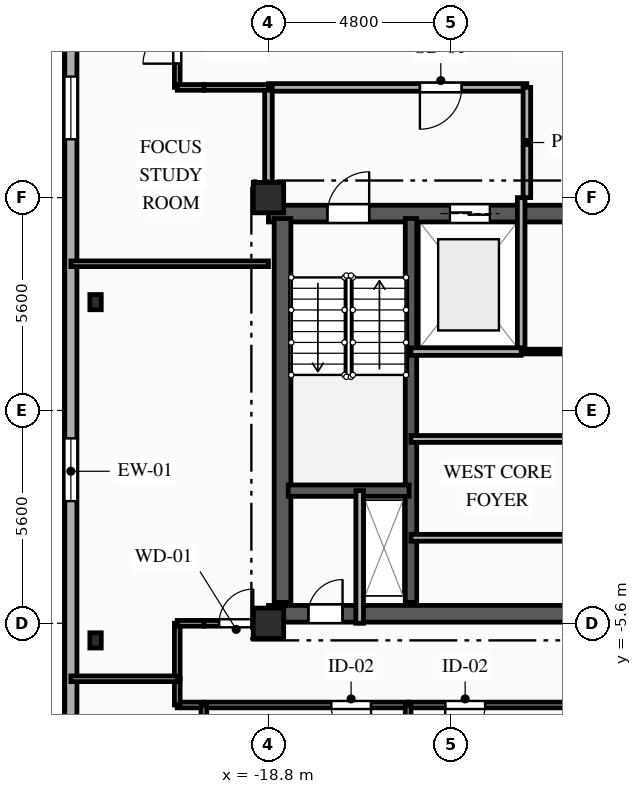
"""IFC4 building model, lengths in metres.
Left out: names, types, materials, properties, quantities, classifications, styles, units other than length and angle.
Written with IfcOpenShell. Run it as: python <this file> out.ifc"""

import sys

from ifc_helpers import new_model, si_unit, direction, frame, frame_2d, origin, origin_2d, place, context, subcontext, project, spatial, rectangle, i_section, extrude, element, fill, save


model = new_model("IFC4")
c1 = context("Model", 3, precision=1e-05, world=origin(), true_north=direction((0.0, 1.0)))
c2 = subcontext(c1, "Body", "Model", "MODEL_VIEW")
j1 = project(units=[si_unit("LENGTHUNIT", "METRE"), si_unit("PLANEANGLEUNIT", "RADIAN")], contexts=[c1])
p1 = place(None, origin())
s1 = spatial("IfcSite", under=j1, at=p1, CompositionType="ELEMENT")
p2 = place(p1, origin())
s2 = spatial("IfcBuilding", under=s1, at=p2, CompositionType="ELEMENT")
p3 = place(p2, frame((0.0, 0.0, 255.1)))
s3 = spatial("IfcBuildingStorey", under=s2, at=p3, CompositionType="ELEMENT", Elevation=255.1)
for number, where, z_axis, x_axis in (
    (1, (-18.8, -5.6, 0.0), (0.0, 0.0, 1.0), (1.0, 0.0, 0.0)),
    (2, (-18.8, 5.6, 0.0), (0.0, 0.0, 1.0), (1.0, 0.0, 0.0)),
):
    element("IfcColumn", number, at=place(p3, frame(where, z_axis=z_axis, x_axis=x_axis)), inside=s3, PredefinedType="COLUMN", context=c2, shape_type="SweptSolid", body=[
        extrude(rectangle(XDim=0.8, YDim=0.8, at=origin_2d()), origin(), (0.0, 0.0, 1.0), 3.35),
    ])
for number, where, z_axis, x_axis in (
    (3, (-23.35, 2.85, 0.0), (0.0, 0.0, 1.0), (1.0, 0.0, 0.0)),
    (4, (-23.35, -6.05, 0.0), (0.0, 0.0, 1.0), (1.0, 0.0, 0.0)),
):
    element("IfcColumn", number, at=place(p3, frame(where, z_axis=z_axis, x_axis=x_axis)), inside=s3, PredefinedType="COLUMN", context=c2, shape_type="SweptSolid", body=[
        extrude(i_section(OverallWidth=0.3, OverallDepth=0.4, WebThickness=0.013, FlangeThickness=0.024, FilletRadius=0.027, at=origin_2d()), origin(), (0.0, 0.0, 1.0), 3.35),
    ])
p4 = place(p3, frame((-24.0, -15.6, 0.0), z_axis=(0.0, 0.0, 1.0), x_axis=(0.0, 1.0, 0.0)))
e5 = element("IfcWall", 5, at=p4, inside=s3, PredefinedType="SOLIDWALL", context=c2, shape_type="SweptSolid", body=[
    extrude(rectangle(XDim=28.0, YDim=0.32, at=frame_2d((14.0, 0.0))), origin(), (0.0, 0.0, 1.0), 3.04),
])
p5 = place(p4, frame((3.695, 0.0, 0.85)))
e6 = element("IfcOpeningElement", 6, at=p5, cuts=e5, PredefinedType="OPENING", context=c2, shape_type="SweptSolid", body=[
    extrude(rectangle(XDim=1.65, YDim=1.85, at=frame_2d((0.825, 0.925))), frame((0.0, 0.17, 0.0), z_axis=(0.0, -1.0, 0.0), x_axis=(1.0, 0.0, 0.0)), (0.0, 0.0, 1.0), 0.34),
])
p6 = place(p4, frame((13.215, 0.0, 0.85)))
e7 = element("IfcOpeningElement", 7, at=p6, cuts=e5, PredefinedType="OPENING", context=c2, shape_type="SweptSolid", body=[
    extrude(rectangle(XDim=1.65, YDim=1.85, at=frame_2d((0.825, 0.925))), frame((0.0, 0.17, 0.0), z_axis=(0.0, -1.0, 0.0), x_axis=(1.0, 0.0, 0.0)), (0.0, 0.0, 1.0), 0.34),
])
p7 = place(p4, frame((22.735, 0.0, 0.85)))
e8 = element("IfcOpeningElement", 8, at=p7, cuts=e5, PredefinedType="OPENING", context=c2, shape_type="SweptSolid", body=[
    extrude(rectangle(XDim=1.65, YDim=1.85, at=frame_2d((0.825, 0.925))), frame((0.0, 0.17, 0.0), z_axis=(0.0, -1.0, 0.0), x_axis=(1.0, 0.0, 0.0)), (0.0, 0.0, 1.0), 0.34),
])
p8 = place(p3, frame((-18.8, 5.18, 0.0), z_axis=(0.0, 0.0, 1.0), x_axis=(1.0, 0.0, 0.0)))
e9 = element("IfcWall", 9, at=p8, inside=s3, PredefinedType="SHEAR", context=c2, shape_type="SweptSolid", body=[
    extrude(rectangle(XDim=9.6, YDim=0.44, at=frame_2d((4.8, 0.0))), origin(), (0.0, 0.0, 1.0), 3.04),
])
p9 = place(p8, frame((1.55, 0.0, 0.0)))
e10 = element("IfcOpeningElement", 10, at=p9, cuts=e9, PredefinedType="OPENING", context=c2, shape_type="SweptSolid", body=[
    extrude(rectangle(XDim=1.1, YDim=2.15, at=frame_2d((0.55, 1.075))), frame((0.0, 0.23, 0.0), z_axis=(0.0, -1.0, 0.0), x_axis=(1.0, 0.0, 0.0)), (0.0, 0.0, 1.0), 0.46),
])
p10 = place(p8, frame((4.775, 0.0, 0.0)))
e11 = element("IfcOpeningElement", 11, at=p10, cuts=e9, PredefinedType="OPENING", context=c2, shape_type="SweptSolid", body=[
    extrude(rectangle(XDim=1.05, YDim=2.1, at=frame_2d((0.525, 1.05))), frame((0.0, 0.23, 0.0), z_axis=(0.0, -1.0, 0.0), x_axis=(1.0, 0.0, 0.0)), (0.0, 0.0, 1.0), 0.46),
])
p11 = place(p3, frame((-18.8, -5.35, 0.0), z_axis=(0.0, 0.0, 1.0), x_axis=(1.0, 0.0, 0.0)))
e12 = element("IfcWall", 12, at=p11, inside=s3, PredefinedType="SHEAR", context=c2, shape_type="SweptSolid", body=[
    extrude(rectangle(XDim=9.6, YDim=0.44, at=frame_2d((4.8, 0.0))), origin(), (0.0, 0.0, 1.0), 3.04),
])
p12 = place(p11, frame((1.05, 0.0, 0.0)))
e13 = element("IfcOpeningElement", 13, at=p12, cuts=e12, PredefinedType="OPENING", context=c2, shape_type="SweptSolid", body=[
    extrude(rectangle(XDim=0.9, YDim=2.1, at=frame_2d((0.45, 1.05))), frame((0.0, 0.23, 0.0), z_axis=(0.0, -1.0, 0.0), x_axis=(1.0, 0.0, 0.0)), (0.0, 0.0, 1.0), 0.46),
])
p13 = place(p3, frame((-18.43, -5.05, 0.0), z_axis=(0.0, 0.0, 1.0), x_axis=(0.0, 1.0, 0.0)))
e14 = element("IfcWall", 14, at=p13, inside=s3, PredefinedType="SHEAR", context=c2, shape_type="SweptSolid", body=[
    extrude(rectangle(XDim=10.1, YDim=0.44, at=frame_2d((5.05, 0.0))), origin(), (0.0, 0.0, 1.0), 3.04),
])
p14 = place(p3, frame((-15.05, -5.05, 0.0), z_axis=(0.0, 0.0, 1.0), x_axis=(0.0, 1.0, 0.0)))
e15 = element("IfcWall", 15, at=p14, inside=s3, PredefinedType="SHEAR", context=c2, shape_type="SweptSolid", body=[
    extrude(rectangle(XDim=10.1, YDim=0.3, at=frame_2d((5.05, 0.0))), origin(), (0.0, 0.0, 1.0), 3.04),
])
p15 = place(p3, frame((-18.28, -2.11, 0.0), z_axis=(0.0, 0.0, 1.0), x_axis=(1.0, 0.0, 0.0)))
e16 = element("IfcWall", 16, at=p15, inside=s3, PredefinedType="SHEAR", context=c2, shape_type="SweptSolid", body=[
    extrude(rectangle(XDim=3.18, YDim=0.3, at=frame_2d((1.59, 0.0))), origin(), (0.0, 0.0, 1.0), 3.04),
])
p16 = place(p3, frame((-16.4, -5.6, 0.0), z_axis=(0.0, 0.0, 1.0), x_axis=(0.0, 1.0, 0.0)))
e17 = element("IfcWall", 17, at=p16, inside=s3, PredefinedType="PARTITIONING", context=c2, shape_type="SweptSolid", body=[
    extrude(rectangle(XDim=3.49, YDim=0.2, at=frame_2d((1.745, 0.0))), origin(), (0.0, 0.0, 1.0), 3.04),
])
p17 = place(p3, frame((-12.15, 1.55, 0.0), z_axis=(0.0, 0.0, 1.0), x_axis=(0.0, 1.0, 0.0)))
e18 = element("IfcWall", 18, at=p17, inside=s3, PredefinedType="PARTITIONING", context=c2, shape_type="SweptSolid", body=[
    extrude(rectangle(XDim=4.05, YDim=0.2, at=frame_2d((2.025, 0.0))), origin(), (0.0, 0.0, 1.0), 3.04),
])
p18 = place(p3, frame((-12.0, 8.5, 0.0), z_axis=(0.0, 0.0, 1.0), x_axis=(-1.0, 0.0, 0.0)))
e19 = element("IfcWall", 19, at=p18, inside=s3, PredefinedType="PARTITIONING", context=c2, shape_type="SweptSolid", body=[
    extrude(rectangle(XDim=6.8, YDim=0.2, at=frame_2d((3.4, 0.0))), origin(), (0.0, 0.0, 1.0), 3.04),
])
p19 = place(p18, frame((1.715, 0.0, 0.0)))
e20 = element("IfcOpeningElement", 20, at=p19, cuts=e19, PredefinedType="OPENING", context=c2, shape_type="SweptSolid", body=[
    extrude(rectangle(XDim=1.1, YDim=2.15, at=frame_2d((0.55, 1.075))), frame((0.0, 0.11, 0.0), z_axis=(0.0, -1.0, 0.0), x_axis=(1.0, 0.0, 0.0)), (0.0, 0.0, 1.0), 0.22),
])
p20 = place(p3, frame((-12.0, 5.6, 0.0), z_axis=(0.0, 0.0, 1.0), x_axis=(0.0, 1.0, 0.0)))
e21 = element("IfcWall", 21, at=p20, inside=s3, PredefinedType="PARTITIONING", context=c2, shape_type="SweptSolid", body=[
    extrude(rectangle(XDim=2.9, YDim=0.2, at=frame_2d((1.45, 0.0))), origin(), (0.0, 0.0, 1.0), 3.04),
])
p21 = place(p3, frame((-18.8, 8.5, 0.0), z_axis=(0.0, 0.0, 1.0), x_axis=(0.0, -1.0, 0.0)))
e22 = element("IfcWall", 22, at=p21, inside=s3, PredefinedType="PARTITIONING", context=c2, shape_type="SweptSolid", body=[
    extrude(rectangle(XDim=2.9, YDim=0.2, at=frame_2d((1.45, 0.0))), origin(), (0.0, 0.0, 1.0), 2.665),
])
p22 = place(p3, frame((-12.15, 1.55, 0.0), z_axis=(0.0, 0.0, 1.0), x_axis=(1.0, 0.0, 0.0)))
e23 = element("IfcWall", 23, at=p22, inside=s3, PredefinedType="PARTITIONING", context=c2, shape_type="SweptSolid", body=[
    extrude(rectangle(XDim=1.45, YDim=0.125, at=frame_2d((0.725, 0.0))), origin(), (0.0, 0.0, 1.0), 3.04),
])
p23 = place(p3, frame((-15.05, -3.35, 0.0), z_axis=(0.0, 0.0, 1.0), x_axis=(1.0, 0.0, 0.0)))
e24 = element("IfcWall", 24, at=p23, inside=s3, PredefinedType="PARTITIONING", context=c2, shape_type="SweptSolid", body=[
    extrude(rectangle(XDim=5.85, YDim=0.18, at=frame_2d((2.925, 0.0))), origin(), (0.0, 0.0, 1.0), 2.755),
])
p24 = place(p3, frame((-9.2, -0.75, 0.0), z_axis=(0.0, 0.0, 1.0), x_axis=(-1.0, 0.0, 0.0)))
e25 = element("IfcWall", 25, at=p24, inside=s3, PredefinedType="PARTITIONING", context=c2, shape_type="SweptSolid", body=[
    extrude(rectangle(XDim=5.85, YDim=0.18, at=frame_2d((2.925, 0.0))), origin(), (0.0, 0.0, 1.0), 3.04),
])
p25 = place(p3, frame((-21.2, 8.5, 0.0), z_axis=(0.0, 0.0, 1.0), x_axis=(0.0, 1.0, 0.0)))
e26 = element("IfcWall", 26, at=p25, inside=s3, PredefinedType="PARTITIONING", context=c2, shape_type="SweptSolid", body=[
    extrude(rectangle(XDim=2.15, YDim=0.15, at=frame_2d((1.075, 0.0))), origin(), (0.0, 0.0, 1.0), 2.695),
])
p26 = place(p25, frame((0.625, 0.0, 0.0)))
e27 = element("IfcOpeningElement", 27, at=p26, cuts=e26, PredefinedType="OPENING", context=c2, shape_type="SweptSolid", body=[
    extrude(rectangle(XDim=0.9, YDim=2.1, at=frame_2d((0.45, 1.05))), frame((0.0, 0.085, 0.0), z_axis=(0.0, -1.0, 0.0), x_axis=(1.0, 0.0, 0.0)), (0.0, 0.0, 1.0), 0.17),
])
p27 = place(p3, frame((-18.8, 8.5, 0.0), z_axis=(0.0, 0.0, 1.0), x_axis=(-1.0, 0.0, 0.0)))
e28 = element("IfcWall", 28, at=p27, inside=s3, PredefinedType="PARTITIONING", context=c2, shape_type="SweptSolid", body=[
    extrude(rectangle(XDim=1.7, YDim=0.15, at=frame_2d((0.85, 0.0))), origin(), (0.0, 0.0, 1.0), 3.04),
])
for number, where, z_axis, x_axis in (
    (29, (-20.5, 8.5, 0.0), (0.0, 0.0, 1.0), (-1.0, 0.0, 0.0)),
    (30, (-20.5, -7.75, 0.0), (0.0, 0.0, 1.0), (-1.0, 0.0, 0.0)),
):
    element("IfcWall", number, at=place(p3, frame(where, z_axis=z_axis, x_axis=x_axis)), inside=s3, PredefinedType="PARTITIONING", context=c2, shape_type="SweptSolid", body=[
        extrude(rectangle(XDim=0.7, YDim=0.15, at=frame_2d((0.35, 0.0))), origin(), (0.0, 0.0, 1.0), 3.04),
    ])
p28 = place(p3, frame((-21.2, -7.75, 0.0), z_axis=(0.0, 0.0, 1.0), x_axis=(0.0, 1.0, 0.0)))
e31 = element("IfcWall", 31, at=p28, inside=s3, PredefinedType="PARTITIONING", context=c2, shape_type="SweptSolid", body=[
    extrude(rectangle(XDim=0.69, YDim=0.15, at=frame_2d((0.345, 0.0))), origin(), (0.0, 0.0, 1.0), 2.695),
])
p29 = place(p3, frame((-20.5, -5.6, 0.0), z_axis=(0.0, 0.0, 1.0), x_axis=(1.0, 0.0, 0.0)))
e32 = element("IfcWall", 32, at=p29, inside=s3, PredefinedType="PARTITIONING", context=c2, shape_type="SweptSolid", body=[
    extrude(rectangle(XDim=1.7, YDim=0.15, at=frame_2d((0.85, 0.0))), origin(), (0.0, 0.0, 1.0), 3.04),
])
p30 = place(p29, frame((0.4, 0.0, 0.0)))
e33 = element("IfcOpeningElement", 33, at=p30, cuts=e32, PredefinedType="OPENING", context=c2, shape_type="SweptSolid", body=[
    extrude(rectangle(XDim=0.9, YDim=2.1, at=frame_2d((0.45, 1.05))), frame((0.0, 0.085, 0.0), z_axis=(0.0, -1.0, 0.0), x_axis=(1.0, 0.0, 0.0)), (0.0, 0.0, 1.0), 0.17),
])
p31 = place(p3, frame((-21.2, -7.06, 0.0), z_axis=(0.0, 0.0, 1.0), x_axis=(0.0, 1.0, 0.0)))
e34 = element("IfcWall", 34, at=p31, inside=s3, PredefinedType="PARTITIONING", context=c2, shape_type="SweptSolid", body=[
    extrude(rectangle(XDim=1.46, YDim=0.15, at=frame_2d((0.73, 0.0))), origin(), (0.0, 0.0, 1.0), 2.695),
])
p32 = place(p3, frame((-21.2, -5.6, 0.0), z_axis=(0.0, 0.0, 1.0), x_axis=(1.0, 0.0, 0.0)))
e35 = element("IfcWall", 35, at=p32, inside=s3, PredefinedType="PARTITIONING", context=c2, shape_type="SweptSolid", body=[
    extrude(rectangle(XDim=0.7, YDim=0.15, at=frame_2d((0.35, 0.0))), origin(), (0.0, 0.0, 1.0), 3.04),
])
p33 = place(p3, frame((-15.125, -7.75, 0.0), z_axis=(0.0, 0.0, 1.0), x_axis=(-1.0, 0.0, 0.0)))
e36 = element("IfcWall", 36, at=p33, inside=s3, PredefinedType="PARTITIONING", context=c2, shape_type="SweptSolid", body=[
    extrude(rectangle(XDim=5.375, YDim=0.15, at=frame_2d((2.688, 0.0))), origin(), (0.0, 0.0, 1.0), 3.04),
])
p34 = place(p33, frame((0.976, 0.0, 0.0)))
e37 = element("IfcOpeningElement", 37, at=p34, cuts=e36, PredefinedType="OPENING", context=c2, shape_type="SweptSolid", body=[
    extrude(rectangle(XDim=1.05, YDim=2.15, at=frame_2d((0.525, 1.075))), frame((0.0, 0.085, 0.0), z_axis=(0.0, -1.0, 0.0), x_axis=(1.0, 0.0, 0.0)), (0.0, 0.0, 1.0), 0.17),
])
p35 = place(p3, frame((-9.75, -7.75, 0.0), z_axis=(0.0, 0.0, 1.0), x_axis=(-1.0, 0.0, 0.0)))
e38 = element("IfcWall", 38, at=p35, inside=s3, PredefinedType="PARTITIONING", context=c2, shape_type="SweptSolid", body=[
    extrude(rectangle(XDim=5.375, YDim=0.15, at=frame_2d((2.688, 0.0))), origin(), (0.0, 0.0, 1.0), 3.04),
])
p36 = place(p35, frame((3.349, 0.0, 0.0)))
e39 = element("IfcOpeningElement", 39, at=p36, cuts=e38, PredefinedType="OPENING", context=c2, shape_type="SweptSolid", body=[
    extrude(rectangle(XDim=1.05, YDim=2.15, at=frame_2d((0.525, 1.075))), frame((0.0, 0.085, 0.0), z_axis=(0.0, -1.0, 0.0), x_axis=(1.0, 0.0, 0.0)), (0.0, 0.0, 1.0), 0.17),
])
p37 = place(p3, frame((-24.0, -7.06, 0.0), z_axis=(0.0, 0.0, 1.0), x_axis=(1.0, 0.0, 0.0)))
e40 = element("IfcWall", 40, at=p37, inside=s3, PredefinedType="PARTITIONING", context=c2, shape_type="SweptSolid", body=[
    extrude(rectangle(XDim=2.8, YDim=0.15, at=frame_2d((1.4, 0.0))), origin(), (0.0, 0.0, 1.0), 3.04),
])
p38 = place(p3, frame((-20.5, -7.75, 0.0), z_axis=(0.0, 0.0, 1.0), x_axis=(0.0, -1.0, 0.0)))
e41 = element("IfcWall", 41, at=p38, inside=s3, PredefinedType="PARTITIONING", context=c2, shape_type="SweptSolid", body=[
    extrude(rectangle(XDim=10.65, YDim=0.15, at=frame_2d((5.325, 0.0))), origin(), (0.0, 0.0, 1.0), 2.665),
])
p39 = place(p38, frame((2.69, 0.0, 0.0)))
e42 = element("IfcOpeningElement", 42, at=p39, cuts=e41, PredefinedType="OPENING", context=c2, shape_type="SweptSolid", body=[
    extrude(rectangle(XDim=1.05, YDim=2.15, at=frame_2d((0.525, 1.075))), frame((0.0, 0.085, 0.0), z_axis=(0.0, -1.0, 0.0), x_axis=(1.0, 0.0, 0.0)), (0.0, 0.0, 1.0), 0.17),
])
p40 = place(p3, frame((-24.0, 3.86, 0.0), z_axis=(0.0, 0.0, 1.0), x_axis=(1.0, 0.0, 0.0)))
e43 = element("IfcWall", 43, at=p40, inside=s3, PredefinedType="PARTITIONING", context=c2, shape_type="SweptSolid", body=[
    extrude(rectangle(XDim=5.2, YDim=0.15, at=frame_2d((2.6, 0.0))), origin(), (0.0, 0.0, 1.0), 3.04),
])
p41 = place(p3, frame((-15.125, -7.75, 0.0), z_axis=(0.0, 0.0, 1.0), x_axis=(0.0, -1.0, 0.0)))
e44 = element("IfcWall", 44, at=p41, inside=s3, PredefinedType="PARTITIONING", context=c2, shape_type="SweptSolid", body=[
    extrude(rectangle(XDim=10.65, YDim=0.15, at=frame_2d((5.325, 0.0))), origin(), (0.0, 0.0, 1.0), 3.04),
])
p42 = place(p3, frame((-15.05, 1.55, 0.0), z_axis=(0.0, 0.0, 1.0), x_axis=(1.0, 0.0, 0.0)))
e45 = element("IfcWall", 45, at=p42, inside=s3, PredefinedType="PARTITIONING", context=c2, shape_type="SweptSolid", body=[
    extrude(rectangle(XDim=2.9, YDim=0.2, at=frame_2d((1.45, 0.0))), origin(), (0.0, 0.0, 1.0), 3.04),
])
p43 = place(p6, origin())
e46 = element("IfcWindow", 46, at=p43, inside=s3, PartitioningType="SINGLE_PANEL", PredefinedType="WINDOW", context=c2, shape_type="SweptSolid", body=[
    extrude(rectangle(XDim=1.65, YDim=1.85, at=frame_2d((0.825, 0.925))), frame((0.0, 0.03, 0.0), z_axis=(0.0, -1.0, 0.0), x_axis=(1.0, 0.0, 0.0)), (0.0, 0.0, 1.0), 0.06),
])
fill(e7, e46)
p44 = place(p7, origin())
e47 = element("IfcWindow", 47, at=p44, inside=s3, PartitioningType="SINGLE_PANEL", PredefinedType="WINDOW", context=c2, shape_type="SweptSolid", body=[
    extrude(rectangle(XDim=1.65, YDim=1.85, at=frame_2d((0.825, 0.925))), frame((0.0, 0.03, 0.0), z_axis=(0.0, -1.0, 0.0), x_axis=(1.0, 0.0, 0.0)), (0.0, 0.0, 1.0), 0.06),
])
fill(e8, e47)
p45 = place(p9, origin())
e48 = element("IfcDoor", 48, at=p45, inside=s3, OperationType="SINGLE_SWING_RIGHT", PredefinedType="DOOR", context=c2, shape_type="SweptSolid", body=[
    extrude(rectangle(XDim=1.1, YDim=2.15, at=frame_2d((0.55, 1.075))), frame((0.0, 0.025, 0.0), z_axis=(0.0, -1.0, 0.0), x_axis=(1.0, 0.0, 0.0)), (0.0, 0.0, 1.0), 0.05),
])
fill(e10, e48)
p46 = place(p10, origin())
e49 = element("IfcDoor", 49, at=p46, inside=s3, OperationType="DOUBLE_DOOR_SLIDING", PredefinedType="DOOR", context=c2, shape_type="SweptSolid", body=[
    extrude(rectangle(XDim=1.05, YDim=2.1, at=frame_2d((0.525, 1.05))), frame((0.0, 0.025, 0.0), z_axis=(0.0, -1.0, 0.0), x_axis=(1.0, 0.0, 0.0)), (0.0, 0.0, 1.0), 0.05),
])
fill(e11, e49)
p47 = place(p12, origin())
e50 = element("IfcDoor", 50, at=p47, inside=s3, OperationType="SINGLE_SWING_RIGHT", PredefinedType="DOOR", context=c2, shape_type="SweptSolid", body=[
    extrude(rectangle(XDim=0.9, YDim=2.1, at=frame_2d((0.45, 1.05))), frame((0.0, 0.025, 0.0), z_axis=(0.0, -1.0, 0.0), x_axis=(1.0, 0.0, 0.0)), (0.0, 0.0, 1.0), 0.05),
])
fill(e13, e50)
p48 = place(p19, origin())
e51 = element("IfcDoor", 51, at=p48, inside=s3, OperationType="SINGLE_SWING_RIGHT", PredefinedType="DOOR", context=c2, shape_type="SweptSolid", body=[
    extrude(rectangle(XDim=1.1, YDim=2.15, at=frame_2d((0.55, 1.075))), frame((0.0, 0.025, 0.0), z_axis=(0.0, -1.0, 0.0), x_axis=(1.0, 0.0, 0.0)), (0.0, 0.0, 1.0), 0.05),
])
fill(e20, e51)
p49 = place(p26, origin())
e52 = element("IfcDoor", 52, at=p49, inside=s3, OperationType="SINGLE_SWING_LEFT", PredefinedType="DOOR", context=c2, shape_type="SweptSolid", body=[
    extrude(rectangle(XDim=0.9, YDim=2.1, at=frame_2d((0.45, 1.05))), frame((0.0, 0.025, 0.0), z_axis=(0.0, -1.0, 0.0), x_axis=(1.0, 0.0, 0.0)), (0.0, 0.0, 1.0), 0.05),
])
fill(e27, e52)
p50 = place(p30, origin())
e53 = element("IfcDoor", 53, at=p50, inside=s3, OperationType="SINGLE_SWING_RIGHT", PredefinedType="DOOR", context=c2, shape_type="SweptSolid", body=[
    extrude(rectangle(XDim=0.9, YDim=2.1, at=frame_2d((0.45, 1.05))), frame((0.0, 0.025, 0.0), z_axis=(0.0, -1.0, 0.0), x_axis=(1.0, 0.0, 0.0)), (0.0, 0.0, 1.0), 0.05),
])
fill(e33, e53)
p51 = place(p34, origin())
e54 = element("IfcDoor", 54, at=p51, inside=s3, OperationType="SINGLE_SWING_LEFT", PredefinedType="DOOR", context=c2, shape_type="SweptSolid", body=[
    extrude(rectangle(XDim=1.05, YDim=2.15, at=frame_2d((0.525, 1.075))), frame((0.0, 0.025, 0.0), z_axis=(0.0, -1.0, 0.0), x_axis=(1.0, 0.0, 0.0)), (0.0, 0.0, 1.0), 0.05),
])
fill(e37, e54)
p52 = place(p36, origin())
e55 = element("IfcDoor", 55, at=p52, inside=s3, OperationType="SINGLE_SWING_RIGHT", PredefinedType="DOOR", context=c2, shape_type="SweptSolid", body=[
    extrude(rectangle(XDim=1.05, YDim=2.15, at=frame_2d((0.525, 1.075))), frame((0.0, 0.025, 0.0), z_axis=(0.0, -1.0, 0.0), x_axis=(1.0, 0.0, 0.0)), (0.0, 0.0, 1.0), 0.05),
])
fill(e39, e55)
save(model, sys.argv[1])
